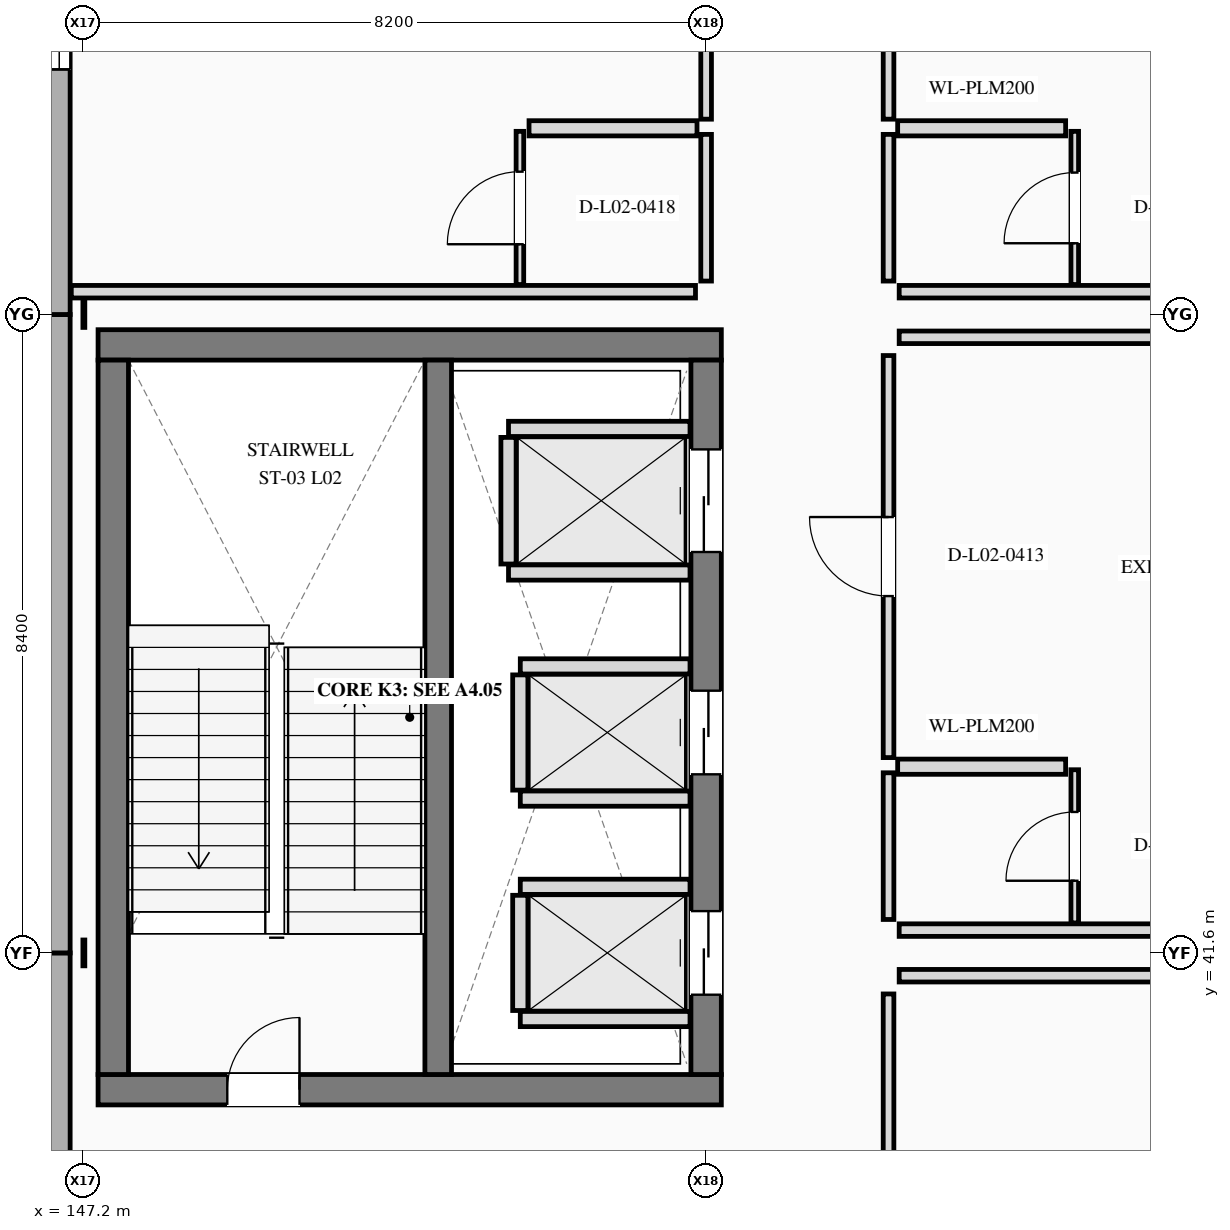
"""IFC4 building model, lengths in metres.
Left out: names, types, materials, properties, quantities, classifications, styles, units other than length and angle.
Written with IfcOpenShell. Run it as: python <this file> out.ifc"""

import sys

from ifc_helpers import new_model, si_unit, direction, frame, frame_2d, origin, place, context, subcontext, project, spatial, rectangle, extrude, element, fill, save


model = new_model("IFC4")
c1 = context("Model", 3, precision=1e-05, world=origin(), true_north=direction((0.0, 1.0)))
c2 = subcontext(c1, "Body", "Model", "MODEL_VIEW")
j1 = project(units=[si_unit("LENGTHUNIT", "METRE"), si_unit("PLANEANGLEUNIT", "RADIAN")], contexts=[c1])
p1 = place(None, origin())
s1 = spatial("IfcSite", under=j1, at=p1, CompositionType="ELEMENT")
p2 = place(p1, origin())
s2 = spatial("IfcBuilding", under=s1, at=p2, CompositionType="ELEMENT")
p3 = place(p2, frame((0.0, 0.0, 10.8)))
s3 = spatial("IfcBuildingStorey", under=s2, at=p3, CompositionType="ELEMENT", Elevation=10.8)
p4 = place(p3, frame((146.89, 33.2, 0.0), z_axis=(0.0, 0.0, 1.0), x_axis=(0.0, 1.0, 0.0)))
e1 = element("IfcWall", 1, at=p4, inside=s3, PredefinedType="STANDARD", context=c2, shape_type="SweptSolid", body=[
    extrude(rectangle(XDim=8.4, YDim=0.285, at=frame_2d((4.2, 0.0))), origin(), (0.0, 0.0, 1.0), 4.8),
])
p5 = place(p3, frame((146.89, 41.6, 0.0), z_axis=(0.0, 0.0, 1.0), x_axis=(0.0, 1.0, 0.0)))
e2 = element("IfcWall", 2, at=p5, inside=s3, PredefinedType="STANDARD", context=c2, shape_type="SweptSolid", body=[
    extrude(rectangle(XDim=8.4, YDim=0.285, at=frame_2d((4.2, 0.0))), origin(), (0.0, 0.0, 1.0), 4.8),
])
p6 = place(p3, frame((146.89, 50.0, 0.0), z_axis=(0.0, 0.0, 1.0), x_axis=(0.0, 1.0, 0.0)))
e3 = element("IfcWall", 3, at=p6, inside=s3, PredefinedType="STANDARD", context=c2, shape_type="SweptSolid", body=[
    extrude(rectangle(XDim=8.4, YDim=0.285, at=frame_2d((4.2, 0.0))), origin(), (0.0, 0.0, 1.0), 4.8),
])
p7 = place(p6, frame((3.225, 0.0, 0.85)))
e4 = element("IfcOpeningElement", 4, at=p7, cuts=e3, PredefinedType="OPENING", context=c2, shape_type="SweptSolid", body=[
    extrude(rectangle(XDim=1.95, YDim=1.85, at=frame_2d((0.975, 0.925))), frame((0.0, 0.152, 0.0), z_axis=(0.0, -1.0, 0.0), x_axis=(1.0, 0.0, 0.0)), (0.0, 0.0, 1.0), 0.305),
])
p8 = place(p3, frame((147.4, 39.8, 0.0), z_axis=(0.0, 0.0, 1.0), x_axis=(1.0, 0.0, 0.0)))
e5 = element("IfcWall", 5, at=p8, inside=s3, PredefinedType="SHEAR", context=c2, shape_type="SweptSolid", body=[
    extrude(rectangle(XDim=8.2, YDim=0.4, at=frame_2d((4.1, 0.0))), origin(), (0.0, 0.0, 1.0), 4.8),
])
p9 = place(p8, frame((1.7, 0.0, 0.0)))
e6 = element("IfcOpeningElement", 6, at=p9, cuts=e5, PredefinedType="OPENING", context=c2, shape_type="SweptSolid", body=[
    extrude(rectangle(XDim=0.95, YDim=2.2, at=frame_2d((0.475, 1.1))), frame((0.0, 0.21, 0.0), z_axis=(0.0, -1.0, 0.0), x_axis=(1.0, 0.0, 0.0)), (0.0, 0.0, 1.0), 0.42),
])
p10 = place(p3, frame((155.6, 49.6, 0.0), z_axis=(0.0, 0.0, 1.0), x_axis=(-1.0, 0.0, 0.0)))
e7 = element("IfcWall", 7, at=p10, inside=s3, PredefinedType="SHEAR", context=c2, shape_type="SweptSolid", body=[
    extrude(rectangle(XDim=8.2, YDim=0.4, at=frame_2d((4.1, 0.0))), origin(), (0.0, 0.0, 1.0), 4.8),
])
p11 = place(p3, frame((147.6, 49.4, 0.0), z_axis=(0.0, 0.0, 1.0), x_axis=(0.0, -1.0, 0.0)))
e8 = element("IfcWall", 8, at=p11, inside=s3, PredefinedType="SHEAR", context=c2, shape_type="SweptSolid", body=[
    extrude(rectangle(XDim=9.4, YDim=0.4, at=frame_2d((4.7, 0.0))), origin(), (0.0, 0.0, 1.0), 4.8),
])
p12 = place(p3, frame((155.4, 40.0, 0.0), z_axis=(0.0, 0.0, 1.0), x_axis=(0.0, 1.0, 0.0)))
e9 = element("IfcWall", 9, at=p12, inside=s3, PredefinedType="SHEAR", context=c2, shape_type="SweptSolid", body=[
    extrude(rectangle(XDim=9.4, YDim=0.4, at=frame_2d((4.7, 0.0))), origin(), (0.0, 0.0, 1.0), 4.8),
])
p13 = place(p12, frame((1.05, 0.0, 0.0)))
e10 = element("IfcOpeningElement", 10, at=p13, cuts=e9, PredefinedType="OPENING", context=c2, shape_type="SweptSolid", body=[
    extrude(rectangle(XDim=1.1, YDim=2.2, at=frame_2d((0.55, 1.1))), frame((0.0, 0.21, 0.0), z_axis=(0.0, -1.0, 0.0), x_axis=(1.0, 0.0, 0.0)), (0.0, 0.0, 1.0), 0.42),
])
p14 = place(p12, frame((3.95, 0.0, 0.0)))
e11 = element("IfcOpeningElement", 11, at=p14, cuts=e9, PredefinedType="OPENING", context=c2, shape_type="SweptSolid", body=[
    extrude(rectangle(XDim=1.1, YDim=2.2, at=frame_2d((0.55, 1.1))), frame((0.0, 0.21, 0.0), z_axis=(0.0, -1.0, 0.0), x_axis=(1.0, 0.0, 0.0)), (0.0, 0.0, 1.0), 0.42),
])
p15 = place(p12, frame((6.875, 0.0, 0.0)))
e12 = element("IfcOpeningElement", 12, at=p15, cuts=e9, PredefinedType="OPENING", context=c2, shape_type="SweptSolid", body=[
    extrude(rectangle(XDim=1.35, YDim=2.3, at=frame_2d((0.675, 1.15))), frame((0.0, 0.21, 0.0), z_axis=(0.0, -1.0, 0.0), x_axis=(1.0, 0.0, 0.0)), (0.0, 0.0, 1.0), 0.42),
])
p16 = place(p3, frame((151.875, 40.0, 0.0), z_axis=(0.0, 0.0, 1.0), x_axis=(0.0, 1.0, 0.0)))
e13 = element("IfcWall", 13, at=p16, inside=s3, PredefinedType="SHEAR", context=c2, shape_type="SweptSolid", body=[
    extrude(rectangle(XDim=9.4, YDim=0.35, at=frame_2d((4.7, 0.0))), origin(), (0.0, 0.0, 1.0), 4.8),
])
for number, where, z_axis, x_axis in (
    (14, (152.955, 40.73, 0.0), (0.0, 0.0, 1.0), (1.0, 0.0, 0.0)),
    (15, (152.955, 42.47, 0.0), (0.0, 0.0, 1.0), (1.0, 0.0, 0.0)),
):
    element("IfcWall", number, at=place(p3, frame(where, z_axis=z_axis, x_axis=x_axis)), inside=s3, PredefinedType="PLUMBINGWALL", context=c2, shape_type="SweptSolid", body=[
        extrude(rectangle(XDim=2.233, YDim=0.2, at=frame_2d((1.116, 0.0))), origin(), (0.0, 0.0, 1.0), 4.475),
    ])
p17 = place(p3, frame((152.955, 40.842, 0.0), z_axis=(0.0, 0.0, 1.0), x_axis=(0.0, 1.0, 0.0)))
e16 = element("IfcWall", 16, at=p17, inside=s3, PredefinedType="PLUMBINGWALL", context=c2, shape_type="SweptSolid", body=[
    extrude(rectangle(XDim=1.516, YDim=0.2, at=frame_2d((0.758, 0.0))), origin(), (0.0, 0.0, 1.0), 4.475),
])
for number, where, z_axis, x_axis in (
    (17, (152.955, 43.63, 0.0), (0.0, 0.0, 1.0), (1.0, 0.0, 0.0)),
    (18, (152.955, 45.37, 0.0), (0.0, 0.0, 1.0), (1.0, 0.0, 0.0)),
):
    element("IfcWall", number, at=place(p3, frame(where, z_axis=z_axis, x_axis=x_axis)), inside=s3, PredefinedType="PLUMBINGWALL", context=c2, shape_type="SweptSolid", body=[
        extrude(rectangle(XDim=2.233, YDim=0.2, at=frame_2d((1.116, 0.0))), origin(), (0.0, 0.0, 1.0), 4.475),
    ])
p18 = place(p3, frame((152.955, 43.742, 0.0), z_axis=(0.0, 0.0, 1.0), x_axis=(0.0, 1.0, 0.0)))
e19 = element("IfcWall", 19, at=p18, inside=s3, PredefinedType="PLUMBINGWALL", context=c2, shape_type="SweptSolid", body=[
    extrude(rectangle(XDim=1.516, YDim=0.2, at=frame_2d((0.758, 0.0))), origin(), (0.0, 0.0, 1.0), 4.475),
])
for number, where, z_axis, x_axis in (
    (20, (152.8, 46.605, 0.0), (0.0, 0.0, 1.0), (1.0, 0.0, 0.0)),
    (21, (152.8, 48.495, 0.0), (0.0, 0.0, 1.0), (1.0, 0.0, 0.0)),
):
    element("IfcWall", number, at=place(p3, frame(where, z_axis=z_axis, x_axis=x_axis)), inside=s3, PredefinedType="PLUMBINGWALL", context=c2, shape_type="SweptSolid", body=[
        extrude(rectangle(XDim=2.388, YDim=0.2, at=frame_2d((1.194, 0.0))), origin(), (0.0, 0.0, 1.0), 4.475),
    ])
p19 = place(p3, frame((152.8, 46.717, 0.0), z_axis=(0.0, 0.0, 1.0), x_axis=(0.0, 1.0, 0.0)))
e22 = element("IfcWall", 22, at=p19, inside=s3, PredefinedType="PLUMBINGWALL", context=c2, shape_type="SweptSolid", body=[
    extrude(rectangle(XDim=1.666, YDim=0.2, at=frame_2d((0.833, 0.0))), origin(), (0.0, 0.0, 1.0), 4.475),
])
p20 = place(p3, frame((157.8, 35.77, 0.0), z_axis=(0.0, 0.0, 1.0), x_axis=(0.0, 1.0, 0.0)))
e23 = element("IfcWall", 23, at=p20, inside=s3, PredefinedType="PARTITIONING", context=c2, shape_type="SweptSolid", body=[
    extrude(rectangle(XDim=5.29, YDim=0.14, at=frame_2d((2.645, 0.0))), origin(), (0.0, 0.0, 1.0), 4.475),
])
p21 = place(p20, frame((2.155, 0.0, 0.0)))
e24 = element("IfcOpeningElement", 24, at=p21, cuts=e23, PredefinedType="OPENING", context=c2, shape_type="SweptSolid", body=[
    extrude(rectangle(XDim=0.98, YDim=2.2, at=frame_2d((0.49, 1.1))), frame((0.0, 0.08, 0.0), z_axis=(0.0, -1.0, 0.0), x_axis=(1.0, 0.0, 0.0)), (0.0, 0.0, 1.0), 0.16),
])
p22 = place(p3, frame((157.94, 41.3, 0.0), z_axis=(0.0, 0.0, 1.0), x_axis=(1.0, 0.0, 0.0)))
e25 = element("IfcWall", 25, at=p22, inside=s3, PredefinedType="PARTITIONING", context=c2, shape_type="SweptSolid", body=[
    extrude(rectangle(XDim=8.213, YDim=0.165, at=frame_2d((4.106, 0.0))), origin(), (0.0, 0.0, 1.0), 3.865),
])
p23 = place(p3, frame((157.8, 42.04, 0.0), z_axis=(0.0, 0.0, 1.0), x_axis=(0.0, 1.0, 0.0)))
e26 = element("IfcWall", 26, at=p23, inside=s3, PredefinedType="PARTITIONING", context=c2, shape_type="SweptSolid", body=[
    extrude(rectangle(XDim=1.93, YDim=0.14, at=frame_2d((0.965, 0.0))), origin(), (0.0, 0.0, 1.0), 4.028),
])
p24 = place(p3, frame((157.8, 44.17, 0.0), z_axis=(0.0, 0.0, 1.0), x_axis=(0.0, 1.0, 0.0)))
e27 = element("IfcWall", 27, at=p24, inside=s3, PredefinedType="PARTITIONING", context=c2, shape_type="SweptSolid", body=[
    extrude(rectangle(XDim=5.29, YDim=0.14, at=frame_2d((2.645, 0.0))), origin(), (0.0, 0.0, 1.0), 4.028),
])
p25 = place(p24, frame((2.125, 0.0, 0.0)))
e28 = element("IfcOpeningElement", 28, at=p25, cuts=e27, PredefinedType="OPENING", context=c2, shape_type="SweptSolid", body=[
    extrude(rectangle(XDim=1.04, YDim=2.25, at=frame_2d((0.52, 1.125))), frame((0.0, 0.08, 0.0), z_axis=(0.0, -1.0, 0.0), x_axis=(1.0, 0.0, 0.0)), (0.0, 0.0, 1.0), 0.16),
])
for number, where, z_axis, x_axis in (
    (29, (157.94, 41.9, 0.0), (0.0, 0.0, 1.0), (1.0, 0.0, 0.0)),
    (30, (157.94, 49.7, 0.0), (0.0, 0.0, 1.0), (1.0, 0.0, 0.0)),
):
    element("IfcWall", number, at=place(p3, frame(where, z_axis=z_axis, x_axis=x_axis)), inside=s3, PredefinedType="PARTITIONING", context=c2, shape_type="SweptSolid", body=[
        extrude(rectangle(XDim=8.213, YDim=0.165, at=frame_2d((4.106, 0.0))), origin(), (0.0, 0.0, 1.0), 3.865),
    ])
p26 = place(p3, frame((157.92, 44.05, 0.0), z_axis=(0.0, 0.0, 1.0), x_axis=(1.0, 0.0, 0.0)))
e31 = element("IfcWall", 31, at=p26, inside=s3, PredefinedType="PLUMBINGWALL", context=c2, shape_type="SweptSolid", body=[
    extrude(rectangle(XDim=2.21, YDim=0.2, at=frame_2d((1.105, 0.0))), origin(), (0.0, 0.0, 1.0), 4.475),
])
p27 = place(p3, frame((160.25, 41.994, 0.0), z_axis=(0.0, 0.0, 1.0), x_axis=(0.0, 1.0, 0.0)))
e32 = element("IfcWall", 32, at=p27, inside=s3, PredefinedType="PARTITIONING", context=c2, shape_type="SweptSolid", body=[
    extrude(rectangle(XDim=2.016, YDim=0.1, at=frame_2d((1.008, 0.0))), origin(), (0.0, 0.0, 1.0), 4.028),
])
p28 = place(p27, frame((0.555, 0.0, 0.0)))
e33 = element("IfcOpeningElement", 33, at=p28, cuts=e32, PredefinedType="OPENING", context=c2, shape_type="SweptSolid", body=[
    extrude(rectangle(XDim=0.905, YDim=2.18, at=frame_2d((0.453, 1.09))), frame((0.0, 0.06, 0.0), z_axis=(0.0, -1.0, 0.0), x_axis=(1.0, 0.0, 0.0)), (0.0, 0.0, 1.0), 0.12),
])
p29 = place(p3, frame((157.8, 50.44, 0.0), z_axis=(0.0, 0.0, 1.0), x_axis=(0.0, 1.0, 0.0)))
e34 = element("IfcWall", 34, at=p29, inside=s3, PredefinedType="PARTITIONING", context=c2, shape_type="SweptSolid", body=[
    extrude(rectangle(XDim=1.93, YDim=0.14, at=frame_2d((0.965, 0.0))), origin(), (0.0, 0.0, 1.0), 4.475),
])
p30 = place(p3, frame((157.8, 52.57, 0.0), z_axis=(0.0, 0.0, 1.0), x_axis=(0.0, 1.0, 0.0)))
e35 = element("IfcWall", 35, at=p30, inside=s3, PredefinedType="PARTITIONING", context=c2, shape_type="SweptSolid", body=[
    extrude(rectangle(XDim=5.29, YDim=0.14, at=frame_2d((2.645, 0.0))), origin(), (0.0, 0.0, 1.0), 4.475),
])
p31 = place(p30, frame((2.11, 0.0, 0.0)))
e36 = element("IfcOpeningElement", 36, at=p31, cuts=e35, PredefinedType="OPENING", context=c2, shape_type="SweptSolid", body=[
    extrude(rectangle(XDim=1.07, YDim=2.25, at=frame_2d((0.535, 1.125))), frame((0.0, 0.08, 0.0), z_axis=(0.0, -1.0, 0.0), x_axis=(1.0, 0.0, 0.0)), (0.0, 0.0, 1.0), 0.16),
])
p32 = place(p3, frame((157.94, 50.3, 0.0), z_axis=(0.0, 0.0, 1.0), x_axis=(1.0, 0.0, 0.0)))
e37 = element("IfcWall", 37, at=p32, inside=s3, PredefinedType="PARTITIONING", context=c2, shape_type="SweptSolid", body=[
    extrude(rectangle(XDim=8.213, YDim=0.165, at=frame_2d((4.106, 0.0))), origin(), (0.0, 0.0, 1.0), 3.865),
])
p33 = place(p3, frame((157.92, 52.45, 0.0), z_axis=(0.0, 0.0, 1.0), x_axis=(1.0, 0.0, 0.0)))
e38 = element("IfcWall", 38, at=p33, inside=s3, PredefinedType="PLUMBINGWALL", context=c2, shape_type="SweptSolid", body=[
    extrude(rectangle(XDim=2.21, YDim=0.2, at=frame_2d((1.105, 0.0))), origin(), (0.0, 0.0, 1.0), 4.475),
])
p34 = place(p3, frame((160.25, 50.395, 0.0), z_axis=(0.0, 0.0, 1.0), x_axis=(0.0, 1.0, 0.0)))
e39 = element("IfcWall", 39, at=p34, inside=s3, PredefinedType="PARTITIONING", context=c2, shape_type="SweptSolid", body=[
    extrude(rectangle(XDim=2.015, YDim=0.1, at=frame_2d((1.008, 0.0))), origin(), (0.0, 0.0, 1.0), 4.475),
])
p35 = place(p34, frame((0.543, 0.0, 0.0)))
e40 = element("IfcOpeningElement", 40, at=p35, cuts=e39, PredefinedType="OPENING", context=c2, shape_type="SweptSolid", body=[
    extrude(rectangle(XDim=0.93, YDim=2.22, at=frame_2d((0.465, 1.11))), frame((0.0, 0.06, 0.0), z_axis=(0.0, -1.0, 0.0), x_axis=(1.0, 0.0, 0.0)), (0.0, 0.0, 1.0), 0.12),
])
p36 = place(p3, frame((155.4, 50.44, 0.0), z_axis=(0.0, 0.0, 1.0), x_axis=(0.0, 1.0, 0.0)))
e41 = element("IfcWall", 41, at=p36, inside=s3, PredefinedType="PARTITIONING", context=c2, shape_type="SweptSolid", body=[
    extrude(rectangle(XDim=1.93, YDim=0.14, at=frame_2d((0.965, 0.0))), origin(), (0.0, 0.0, 1.0), 3.865),
])
p37 = place(p3, frame((155.4, 52.57, 0.0), z_axis=(0.0, 0.0, 1.0), x_axis=(0.0, 1.0, 0.0)))
e42 = element("IfcWall", 42, at=p37, inside=s3, PredefinedType="PARTITIONING", context=c2, shape_type="SweptSolid", body=[
    extrude(rectangle(XDim=5.29, YDim=0.14, at=frame_2d((2.645, 0.0))), origin(), (0.0, 0.0, 1.0), 3.865),
])
p38 = place(p37, frame((2.185, 0.0, 0.0)))
e43 = element("IfcOpeningElement", 43, at=p38, cuts=e42, PredefinedType="OPENING", context=c2, shape_type="SweptSolid", body=[
    extrude(rectangle(XDim=0.92, YDim=2.3, at=frame_2d((0.46, 1.15))), frame((0.0, 0.08, 0.0), z_axis=(0.0, -1.0, 0.0), x_axis=(1.0, 0.0, 0.0)), (0.0, 0.0, 1.0), 0.16),
])
p39 = place(p3, frame((147.048, 50.3, 0.0), z_axis=(0.0, 0.0, 1.0), x_axis=(1.0, 0.0, 0.0)))
e44 = element("IfcWall", 44, at=p39, inside=s3, PredefinedType="PARTITIONING", context=c2, shape_type="SweptSolid", body=[
    extrude(rectangle(XDim=8.212, YDim=0.165, at=frame_2d((4.106, 0.0))), origin(), (0.0, 0.0, 1.0), 4.475),
])
p40 = place(p3, frame((153.07, 52.45, 0.0), z_axis=(0.0, 0.0, 1.0), x_axis=(1.0, 0.0, 0.0)))
e45 = element("IfcWall", 45, at=p40, inside=s3, PredefinedType="PLUMBINGWALL", context=c2, shape_type="SweptSolid", body=[
    extrude(rectangle(XDim=2.21, YDim=0.2, at=frame_2d((1.105, 0.0))), origin(), (0.0, 0.0, 1.0), 4.475),
])
p41 = place(p3, frame((152.95, 50.395, 0.0), z_axis=(0.0, 0.0, 1.0), x_axis=(0.0, 1.0, 0.0)))
e46 = element("IfcWall", 46, at=p41, inside=s3, PredefinedType="PARTITIONING", context=c2, shape_type="SweptSolid", body=[
    extrude(rectangle(XDim=2.015, YDim=0.1, at=frame_2d((1.008, 0.0))), origin(), (0.0, 0.0, 1.0), 4.475),
])
p42 = place(p41, frame((0.53, 0.0, 0.0)))
e47 = element("IfcOpeningElement", 47, at=p42, cuts=e46, PredefinedType="OPENING", context=c2, shape_type="SweptSolid", body=[
    extrude(rectangle(XDim=0.955, YDim=2.22, at=frame_2d((0.478, 1.11))), frame((0.0, 0.06, 0.0), z_axis=(0.0, -1.0, 0.0), x_axis=(1.0, 0.0, 0.0)), (0.0, 0.0, 1.0), 0.12),
])
p43 = place(p7, origin())
e48 = element("IfcWindow", 48, at=p43, inside=s3, PartitioningType="SINGLE_PANEL", PredefinedType="WINDOW", context=c2, shape_type="SweptSolid", body=[
    extrude(rectangle(XDim=1.95, YDim=1.85, at=frame_2d((0.975, 0.925))), frame((0.0, 0.03, 0.0), z_axis=(0.0, -1.0, 0.0), x_axis=(1.0, 0.0, 0.0)), (0.0, 0.0, 1.0), 0.06),
])
fill(e4, e48)
p44 = place(p9, origin())
e49 = element("IfcDoor", 49, at=p44, inside=s3, OperationType="SINGLE_SWING_RIGHT", PredefinedType="DOOR", context=c2, shape_type="SweptSolid", body=[
    extrude(rectangle(XDim=0.95, YDim=2.2, at=frame_2d((0.475, 1.1))), frame((0.0, 0.025, 0.0), z_axis=(0.0, -1.0, 0.0), x_axis=(1.0, 0.0, 0.0)), (0.0, 0.0, 1.0), 0.05),
])
fill(e6, e49)
p45 = place(p13, origin())
e50 = element("IfcDoor", 50, at=p45, inside=s3, OperationType="SLIDING_TO_LEFT", PredefinedType="DOOR", context=c2, shape_type="SweptSolid", body=[
    extrude(rectangle(XDim=1.1, YDim=2.2, at=frame_2d((0.55, 1.1))), frame((0.0, 0.025, 0.0), z_axis=(0.0, -1.0, 0.0), x_axis=(1.0, 0.0, 0.0)), (0.0, 0.0, 1.0), 0.05),
])
fill(e10, e50)
p46 = place(p14, origin())
e51 = element("IfcDoor", 51, at=p46, inside=s3, OperationType="SLIDING_TO_RIGHT", PredefinedType="DOOR", context=c2, shape_type="SweptSolid", body=[
    extrude(rectangle(XDim=1.1, YDim=2.2, at=frame_2d((0.55, 1.1))), frame((0.0, 0.025, 0.0), z_axis=(0.0, -1.0, 0.0), x_axis=(1.0, 0.0, 0.0)), (0.0, 0.0, 1.0), 0.05),
])
fill(e11, e51)
p47 = place(p15, origin())
e52 = element("IfcDoor", 52, at=p47, inside=s3, OperationType="SLIDING_TO_LEFT", PredefinedType="DOOR", context=c2, shape_type="SweptSolid", body=[
    extrude(rectangle(XDim=1.35, YDim=2.3, at=frame_2d((0.675, 1.15))), frame((0.0, 0.025, 0.0), z_axis=(0.0, -1.0, 0.0), x_axis=(1.0, 0.0, 0.0)), (0.0, 0.0, 1.0), 0.05),
])
fill(e12, e52)
p48 = place(p25, origin())
e53 = element("IfcDoor", 53, at=p48, inside=s3, OperationType="SINGLE_SWING_RIGHT", PredefinedType="DOOR", context=c2, shape_type="SweptSolid", body=[
    extrude(rectangle(XDim=1.04, YDim=2.25, at=frame_2d((0.52, 1.125))), frame((0.0, 0.025, 0.0), z_axis=(0.0, -1.0, 0.0), x_axis=(1.0, 0.0, 0.0)), (0.0, 0.0, 1.0), 0.05),
])
fill(e28, e53)
p49 = place(p28, origin())
e54 = element("IfcDoor", 54, at=p49, inside=s3, OperationType="SINGLE_SWING_LEFT", PredefinedType="DOOR", context=c2, shape_type="SweptSolid", body=[
    extrude(rectangle(XDim=0.905, YDim=2.18, at=frame_2d((0.453, 1.09))), frame((0.0, 0.025, 0.0), z_axis=(0.0, -1.0, 0.0), x_axis=(1.0, 0.0, 0.0)), (0.0, 0.0, 1.0), 0.05),
])
fill(e33, e54)
p50 = place(p35, origin())
e55 = element("IfcDoor", 55, at=p50, inside=s3, OperationType="SINGLE_SWING_LEFT", PredefinedType="DOOR", context=c2, shape_type="SweptSolid", body=[
    extrude(rectangle(XDim=0.93, YDim=2.22, at=frame_2d((0.465, 1.11))), frame((0.0, 0.025, 0.0), z_axis=(0.0, -1.0, 0.0), x_axis=(1.0, 0.0, 0.0)), (0.0, 0.0, 1.0), 0.05),
])
fill(e40, e55)
p51 = place(p42, origin())
e56 = element("IfcDoor", 56, at=p51, inside=s3, OperationType="SINGLE_SWING_LEFT", PredefinedType="DOOR", context=c2, shape_type="SweptSolid", body=[
    extrude(rectangle(XDim=0.955, YDim=2.22, at=frame_2d((0.478, 1.11))), frame((0.0, 0.025, 0.0), z_axis=(0.0, -1.0, 0.0), x_axis=(1.0, 0.0, 0.0)), (0.0, 0.0, 1.0), 0.05),
])
fill(e47, e56)
save(model, sys.argv[1])
